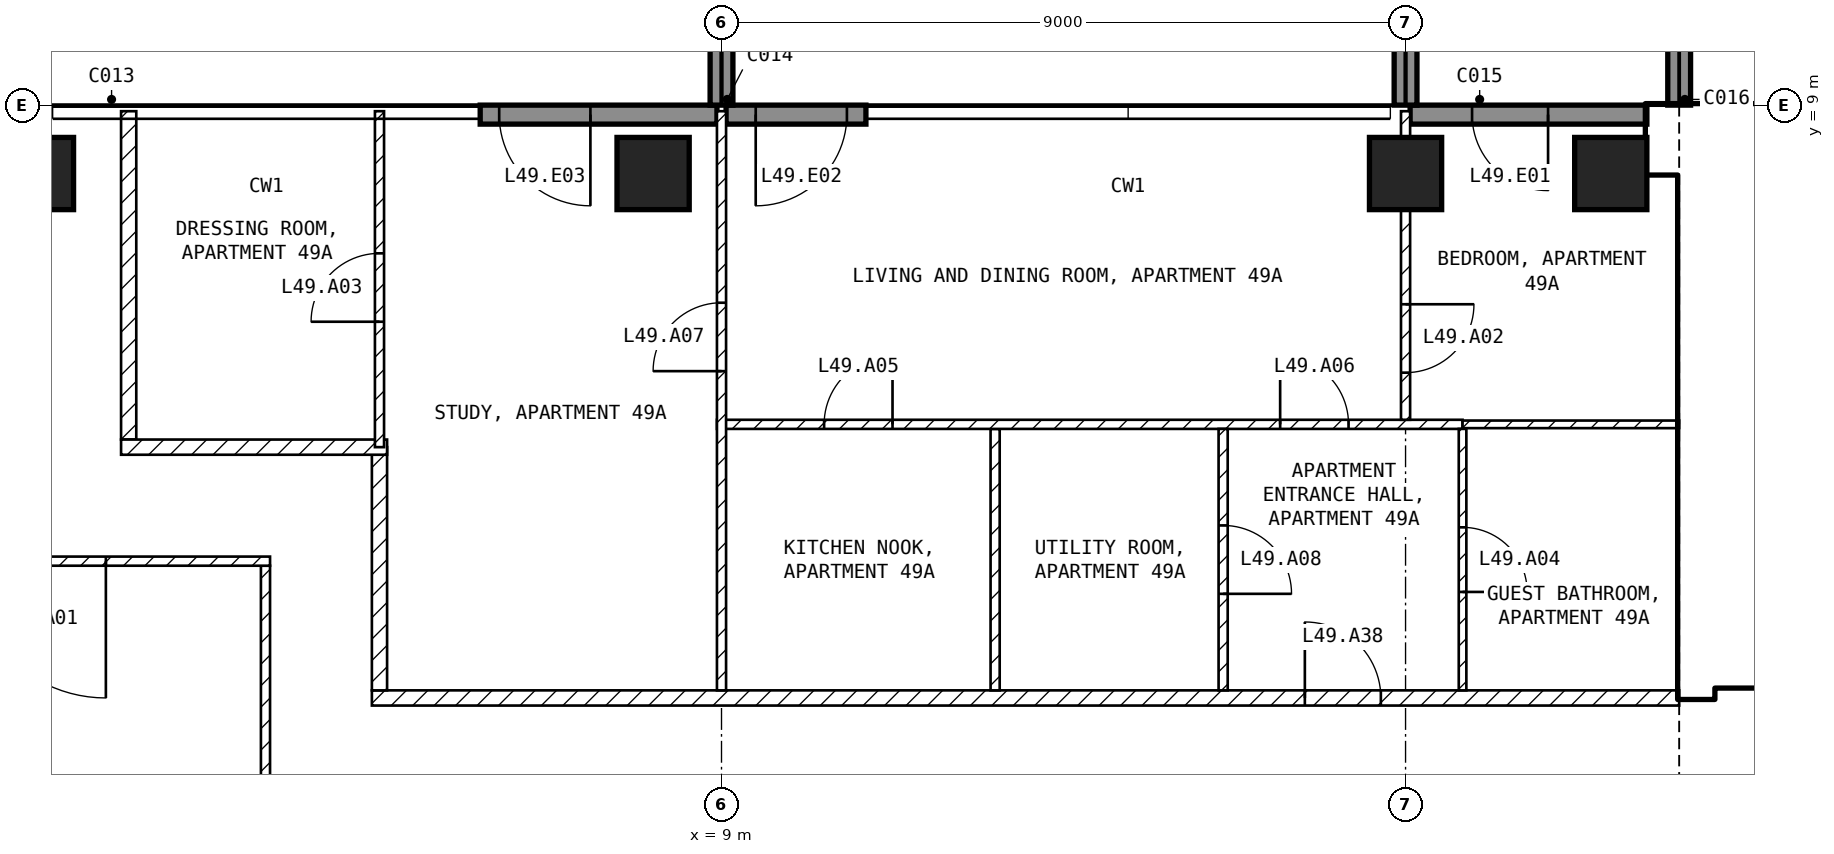
"""IFC4 building model, lengths in metres.
Left out: names, types, materials, properties, quantities, classifications, styles, units other than length and angle.
Written with IfcOpenShell. Run it as: python <this file> out.ifc"""

import sys

from ifc_helpers import new_model, si_unit, direction, frame, frame_2d, origin, origin_2d, place, context, subcontext, project, spatial, rectangle, extrude, element, fill, save


model = new_model("IFC4")
c1 = context("Model", 3, precision=1e-05, world=origin(), true_north=direction((0.0, 1.0)))
c2 = subcontext(c1, "Body", "Model", "MODEL_VIEW")
j1 = project(units=[si_unit("LENGTHUNIT", "METRE"), si_unit("PLANEANGLEUNIT", "RADIAN")], contexts=[c1])
p1 = place(None, origin())
s1 = spatial("IfcSite", under=j1, at=p1, CompositionType="ELEMENT")
p2 = place(p1, origin())
s2 = spatial("IfcBuilding", under=s1, at=p2, CompositionType="ELEMENT")
p3 = place(p2, frame((0.0, 0.0, 198.1)))
s3 = spatial("IfcBuildingStorey", under=s2, at=p3, CompositionType="ELEMENT", Elevation=198.1)
for number, where, z_axis, x_axis in (
    (1, (0.0, 8.1, -0.25), (0.0, 0.0, 1.0), (1.0, 0.0, 0.0)),
    (2, (8.1, 8.1, -0.25), (0.0, 0.0, 1.0), (1.0, 0.0, 0.0)),
    (3, (18.0, 8.1, -0.25), (0.0, 0.0, 1.0), (1.0, 0.0, 0.0)),
    (4, (20.7, 8.1, -0.25), (0.0, 0.0, 1.0), (1.0, 0.0, 0.0)),
):
    element("IfcColumn", number, at=place(p3, frame(where, z_axis=z_axis, x_axis=x_axis)), inside=s3, PredefinedType="COLUMN", context=c2, shape_type="SweptSolid", body=[
        extrude(rectangle(XDim=0.95, YDim=0.95, at=origin_2d()), origin(), (0.0, 0.0, 1.0), 3.5),
    ])
p4 = place(p3, frame((21.175, 8.875, 0.0), z_axis=(0.0, 0.0, 1.0), x_axis=(-1.0, 0.0, 0.0)))
e5 = element("IfcWall", 5, at=p4, inside=s3, PredefinedType="SOLIDWALL", context=c2, shape_type="SweptSolid", body=[
    extrude(rectangle(XDim=3.115, YDim=0.25, at=frame_2d((1.558, 0.0))), origin(), (0.0, 0.0, 1.0), 3.25),
])
p5 = place(p4, frame((1.3, 0.0, 0.0)))
e6 = element("IfcOpeningElement", 6, at=p5, cuts=e5, PredefinedType="OPENING", context=c2, shape_type="SweptSolid", body=[
    extrude(rectangle(XDim=1.0, YDim=2.4, at=frame_2d((0.5, 1.2))), frame((0.0, 0.135, 0.0), z_axis=(0.0, -1.0, 0.0), x_axis=(1.0, 0.0, 0.0)), (0.0, 0.0, 1.0), 0.27),
])
p6 = place(p3, frame((10.9, 8.875, 0.0), z_axis=(0.0, 0.0, 1.0), x_axis=(-1.0, 0.0, 0.0)))
e7 = element("IfcWall", 7, at=p6, inside=s3, PredefinedType="SOLIDWALL", context=c2, shape_type="SweptSolid", body=[
    extrude(rectangle(XDim=1.84, YDim=0.25, at=frame_2d((0.92, 0.0))), origin(), (0.0, 0.0, 1.0), 3.25),
])
p7 = place(p6, frame((0.25, 0.0, 0.0)))
e8 = element("IfcOpeningElement", 8, at=p7, cuts=e7, PredefinedType="OPENING", context=c2, shape_type="SweptSolid", body=[
    extrude(rectangle(XDim=1.2, YDim=2.4, at=frame_2d((0.6, 1.2))), frame((0.0, 0.135, 0.0), z_axis=(0.0, -1.0, 0.0), x_axis=(1.0, 0.0, 0.0)), (0.0, 0.0, 1.0), 0.27),
])
p8 = place(p3, frame((8.94, 8.875, 0.0), z_axis=(0.0, 0.0, 1.0), x_axis=(-1.0, 0.0, 0.0)))
e9 = element("IfcWall", 9, at=p8, inside=s3, PredefinedType="SOLIDWALL", context=c2, shape_type="SweptSolid", body=[
    extrude(rectangle(XDim=3.115, YDim=0.25, at=frame_2d((1.558, 0.0))), origin(), (0.0, 0.0, 1.0), 3.25),
])
p9 = place(p8, frame((1.665, 0.0, 0.0)))
e10 = element("IfcOpeningElement", 10, at=p9, cuts=e9, PredefinedType="OPENING", context=c2, shape_type="SweptSolid", body=[
    extrude(rectangle(XDim=1.2, YDim=2.4, at=frame_2d((0.6, 1.2))), frame((0.0, 0.135, 0.0), z_axis=(0.0, -1.0, 0.0), x_axis=(1.0, 0.0, 0.0)), (0.0, 0.0, 1.0), 0.27),
])
for number, where, z_axis, x_axis in (
    (11, (9.0, 9.0, 0.0), (0.0, 0.0, 1.0), (0.0, 1.0, 0.0)),
    (12, (18.0, 9.0, 0.0), (0.0, 0.0, 1.0), (0.0, 1.0, 0.0)),
    (13, (21.6, 9.0, 0.0), (0.0, 0.0, 1.0), (0.0, 1.0, 0.0)),
):
    element("IfcWall", number, at=place(p3, frame(where, z_axis=z_axis, x_axis=x_axis)), inside=s3, PredefinedType="SOLIDWALL", context=c2, shape_type="SweptSolid", body=[
        extrude(rectangle(XDim=2.7, YDim=0.3, at=frame_2d((1.35, 0.0))), origin(), (0.0, 0.0, 1.0), 3.25),
    ])
p10 = place(p3, frame((21.175, 8.55, 0.0), z_axis=(0.0, 0.0, 1.0), x_axis=(1.0, 0.0, 0.0)))
e14 = element("IfcWall", 14, at=p10, inside=s3, PredefinedType="SHEAR", context=c2, shape_type="SweptSolid", body=[
    extrude(rectangle(XDim=8.425, YDim=0.9, at=frame_2d((4.212, 0.0))), origin(), (0.0, 0.0, 1.0), 3.25),
])
p11 = place(p3, frame((21.825, 1.2, 0.0), z_axis=(0.0, 0.0, 1.0), x_axis=(0.0, 1.0, 0.0)))
e15 = element("IfcWall", 15, at=p11, inside=s3, PredefinedType="SHEAR", context=c2, shape_type="SweptSolid", body=[
    extrude(rectangle(XDim=6.9, YDim=0.45, at=frame_2d((3.45, 0.0))), origin(), (0.0, 0.0, 1.0), 3.25),
])
p12 = place(p3, frame((22.05, 1.45, 0.0), z_axis=(0.0, 0.0, 1.0), x_axis=(1.0, 0.0, 0.0)))
e16 = element("IfcWall", 16, at=p12, inside=s3, PredefinedType="SOLIDWALL", context=c2, shape_type="SweptSolid", body=[
    extrude(rectangle(XDim=11.15, YDim=0.2, at=frame_2d((5.575, 0.0))), origin(), (0.0, 0.0, 1.0), 3.25),
])
p13 = place(p12, frame((0.75, 0.0, 0.0)))
e17 = element("IfcOpeningElement", 17, at=p13, cuts=e16, PredefinedType="OPENING", context=c2, shape_type="SweptSolid", body=[
    extrude(rectangle(XDim=1.0, YDim=2.1, at=frame_2d((0.5, 1.05))), frame((0.0, 0.11, 0.0), z_axis=(0.0, -1.0, 0.0), x_axis=(1.0, 0.0, 0.0)), (0.0, 0.0, 1.0), 0.22),
])
p14 = place(p12, frame((3.25, 0.0, 0.0)))
e18 = element("IfcOpeningElement", 18, at=p14, cuts=e16, PredefinedType="OPENING", context=c2, shape_type="SweptSolid", body=[
    extrude(rectangle(XDim=1.0, YDim=2.1, at=frame_2d((0.5, 1.05))), frame((0.0, 0.11, 0.0), z_axis=(0.0, -1.0, 0.0), x_axis=(1.0, 0.0, 0.0)), (0.0, 0.0, 1.0), 0.22),
])
p15 = place(p12, frame((9.15, 0.0, 0.0)))
e19 = element("IfcOpeningElement", 19, at=p15, cuts=e16, PredefinedType="OPENING", context=c2, shape_type="SweptSolid", body=[
    extrude(rectangle(XDim=0.9, YDim=2.1, at=frame_2d((0.45, 1.05))), frame((0.0, 0.11, 0.0), z_axis=(0.0, -1.0, 0.0), x_axis=(1.0, 0.0, 0.0)), (0.0, 0.0, 1.0), 0.22),
])
p16 = place(p3, frame((22.05, 5.15, 0.0), z_axis=(0.0, 0.0, 1.0), x_axis=(1.0, 0.0, 0.0)))
e20 = element("IfcWall", 20, at=p16, inside=s3, PredefinedType="SOLIDWALL", context=c2, shape_type="SweptSolid", body=[
    extrude(rectangle(XDim=6.3, YDim=0.2, at=frame_2d((3.15, 0.0))), origin(), (0.0, 0.0, 1.0), 3.25),
])
p17 = place(p16, frame((0.2, 0.0, 0.0)))
e21 = element("IfcOpeningElement", 21, at=p17, cuts=e20, PredefinedType="OPENING", context=c2, shape_type="SweptSolid", body=[
    extrude(rectangle(XDim=1.0, YDim=2.1, at=frame_2d((0.5, 1.05))), frame((0.0, 0.11, 0.0), z_axis=(0.0, -1.0, 0.0), x_axis=(1.0, 0.0, 0.0)), (0.0, 0.0, 1.0), 0.22),
])
p18 = place(p3, frame((3.0, -2.94, 0.0), z_axis=(0.0, 0.0, 1.0), x_axis=(0.0, 1.0, 0.0)))
e22 = element("IfcWall", 22, at=p18, inside=s3, PredefinedType="PARTITIONING", context=c2, shape_type="SweptSolid", body=[
    extrude(rectangle(XDim=5.88, YDim=0.12, at=frame_2d((2.94, 0.0))), origin(), (0.0, 0.0, 1.0), 3.25),
])
p19 = place(p3, frame((3.06, 3.0, 0.0), z_axis=(0.0, 0.0, 1.0), x_axis=(-1.0, 0.0, 0.0)))
e23 = element("IfcWall", 23, at=p19, inside=s3, PredefinedType="PARTITIONING", context=c2, shape_type="SweptSolid", body=[
    extrude(rectangle(XDim=6.12, YDim=0.12, at=frame_2d((3.06, 0.0))), origin(), (0.0, 0.0, 1.0), 3.25),
])
p20 = place(p19, frame((2.16, 0.0, 0.0)))
e24 = element("IfcOpeningElement", 24, at=p20, cuts=e23, PredefinedType="OPENING", context=c2, shape_type="SweptSolid", body=[
    extrude(rectangle(XDim=1.8, YDim=2.1, at=frame_2d((0.9, 1.05))), frame((0.0, 0.07, 0.0), z_axis=(0.0, -1.0, 0.0), x_axis=(1.0, 0.0, 0.0)), (0.0, 0.0, 1.0), 0.14),
])
p21 = place(p3, frame((4.4, 1.2, 0.0), z_axis=(0.0, 0.0, 1.0), x_axis=(1.0, 0.0, 0.0)))
e25 = element("IfcWall", 25, at=p21, inside=s3, PredefinedType="PARTITIONING", context=c2, shape_type="SweptSolid", body=[
    extrude(rectangle(XDim=17.2, YDim=0.2, at=frame_2d((8.6, 0.0))), origin(), (0.0, 0.0, 1.0), 3.25),
])
p22 = place(p21, frame((12.275, 0.0, 0.0)))
e26 = element("IfcOpeningElement", 26, at=p22, cuts=e25, PredefinedType="OPENING", context=c2, shape_type="SweptSolid", body=[
    extrude(rectangle(XDim=1.0, YDim=2.1, at=frame_2d((0.5, 1.05))), frame((0.0, 0.11, 0.0), z_axis=(0.0, -1.0, 0.0), x_axis=(1.0, 0.0, 0.0)), (0.0, 0.0, 1.0), 0.22),
])
p23 = place(p3, frame((4.5, 4.5, 0.0), z_axis=(0.0, 0.0, 1.0), x_axis=(0.0, -1.0, 0.0)))
e27 = element("IfcWall", 27, at=p23, inside=s3, PredefinedType="PARTITIONING", context=c2, shape_type="SweptSolid", body=[
    extrude(rectangle(XDim=3.2, YDim=0.2, at=frame_2d((1.6, 0.0))), origin(), (0.0, 0.0, 1.0), 3.25),
])
p24 = place(p3, frame((1.2, 8.92, 0.0), z_axis=(0.0, 0.0, 1.0), x_axis=(0.0, -1.0, 0.0)))
e28 = element("IfcWall", 28, at=p24, inside=s3, PredefinedType="PARTITIONING", context=c2, shape_type="SweptSolid", body=[
    extrude(rectangle(XDim=4.32, YDim=0.2, at=frame_2d((2.16, 0.0))), origin(), (0.0, 0.0, 1.0), 3.25),
])
p25 = place(p3, frame((1.1, 4.5, 0.0), z_axis=(0.0, 0.0, 1.0), x_axis=(1.0, 0.0, 0.0)))
e29 = element("IfcWall", 29, at=p25, inside=s3, PredefinedType="PARTITIONING", context=c2, shape_type="SweptSolid", body=[
    extrude(rectangle(XDim=3.5, YDim=0.2, at=frame_2d((1.75, 0.0))), origin(), (0.0, 0.0, 1.0), 3.25),
])
p26 = place(p3, frame((12.6, 4.74, 0.0), z_axis=(0.0, 0.0, 1.0), x_axis=(0.0, -1.0, 0.0)))
e30 = element("IfcWall", 30, at=p26, inside=s3, PredefinedType="PARTITIONING", context=c2, shape_type="SweptSolid", body=[
    extrude(rectangle(XDim=3.44, YDim=0.12, at=frame_2d((1.72, 0.0))), origin(), (0.0, 0.0, 1.0), 3.25),
])
p27 = place(p3, frame((8.94, 4.8, 0.0), z_axis=(0.0, 0.0, 1.0), x_axis=(1.0, 0.0, 0.0)))
e31 = element("IfcWall", 31, at=p27, inside=s3, PredefinedType="PARTITIONING", context=c2, shape_type="SweptSolid", body=[
    extrude(rectangle(XDim=9.81, YDim=0.12, at=frame_2d((4.905, 0.0))), origin(), (0.0, 0.0, 1.0), 3.25),
])
p28 = place(p27, frame((1.41, 0.0, 0.0)))
e32 = element("IfcOpeningElement", 32, at=p28, cuts=e31, PredefinedType="OPENING", context=c2, shape_type="SweptSolid", body=[
    extrude(rectangle(XDim=0.9, YDim=2.1, at=frame_2d((0.45, 1.05))), frame((0.0, 0.07, 0.0), z_axis=(0.0, -1.0, 0.0), x_axis=(1.0, 0.0, 0.0)), (0.0, 0.0, 1.0), 0.14),
])
p29 = place(p27, frame((7.41, 0.0, 0.0)))
e33 = element("IfcOpeningElement", 33, at=p29, cuts=e31, PredefinedType="OPENING", context=c2, shape_type="SweptSolid", body=[
    extrude(rectangle(XDim=0.9, YDim=2.1, at=frame_2d((0.45, 1.05))), frame((0.0, 0.07, 0.0), z_axis=(0.0, -1.0, 0.0), x_axis=(1.0, 0.0, 0.0)), (0.0, 0.0, 1.0), 0.14),
])
p30 = place(p3, frame((9.0, 1.3, 0.0), z_axis=(0.0, 0.0, 1.0), x_axis=(0.0, 1.0, 0.0)))
e34 = element("IfcWall", 34, at=p30, inside=s3, PredefinedType="PARTITIONING", context=c2, shape_type="SweptSolid", body=[
    extrude(rectangle(XDim=7.62, YDim=0.12, at=frame_2d((3.81, 0.0))), origin(), (0.0, 0.0, 1.0), 3.25),
])
p31 = place(p30, frame((4.2, 0.0, 0.0)))
e35 = element("IfcOpeningElement", 35, at=p31, cuts=e34, PredefinedType="OPENING", context=c2, shape_type="SweptSolid", body=[
    extrude(rectangle(XDim=0.9, YDim=2.1, at=frame_2d((0.45, 1.05))), frame((0.0, 0.07, 0.0), z_axis=(0.0, -1.0, 0.0), x_axis=(1.0, 0.0, 0.0)), (0.0, 0.0, 1.0), 0.14),
])
p32 = place(p3, frame((15.6, 4.74, 0.0), z_axis=(0.0, 0.0, 1.0), x_axis=(0.0, -1.0, 0.0)))
e36 = element("IfcWall", 36, at=p32, inside=s3, PredefinedType="PARTITIONING", context=c2, shape_type="SweptSolid", body=[
    extrude(rectangle(XDim=3.44, YDim=0.12, at=frame_2d((1.72, 0.0))), origin(), (0.0, 0.0, 1.0), 3.25),
])
p33 = place(p32, frame((1.27, 0.0, 0.0)))
e37 = element("IfcOpeningElement", 37, at=p33, cuts=e36, PredefinedType="OPENING", context=c2, shape_type="SweptSolid", body=[
    extrude(rectangle(XDim=0.9, YDim=2.1, at=frame_2d((0.45, 1.05))), frame((0.0, 0.07, 0.0), z_axis=(0.0, -1.0, 0.0), x_axis=(1.0, 0.0, 0.0)), (0.0, 0.0, 1.0), 0.14),
])
p34 = place(p3, frame((18.75, 4.74, 0.0), z_axis=(0.0, 0.0, 1.0), x_axis=(0.0, -1.0, 0.0)))
e38 = element("IfcWall", 38, at=p34, inside=s3, PredefinedType="PARTITIONING", context=c2, shape_type="SweptSolid", body=[
    extrude(rectangle(XDim=3.44, YDim=0.1, at=frame_2d((1.72, 0.0))), origin(), (0.0, 0.0, 1.0), 3.25),
])
p35 = place(p34, frame((1.295, 0.0, 0.0)))
e39 = element("IfcOpeningElement", 39, at=p35, cuts=e38, PredefinedType="OPENING", context=c2, shape_type="SweptSolid", body=[
    extrude(rectangle(XDim=0.85, YDim=2.1, at=frame_2d((0.425, 1.05))), frame((0.0, 0.06, 0.0), z_axis=(0.0, -1.0, 0.0), x_axis=(1.0, 0.0, 0.0)), (0.0, 0.0, 1.0), 0.12),
])
p36 = place(p3, frame((18.75, 4.8, 0.0), z_axis=(0.0, 0.0, 1.0), x_axis=(1.0, 0.0, 0.0)))
e40 = element("IfcWall", 40, at=p36, inside=s3, PredefinedType="PARTITIONING", context=c2, shape_type="SweptSolid", body=[
    extrude(rectangle(XDim=2.85, YDim=0.1, at=frame_2d((1.425, 0.0))), origin(), (0.0, 0.0, 1.0), 3.25),
])
p37 = place(p3, frame((18.0, 8.92, 0.0), z_axis=(0.0, 0.0, 1.0), x_axis=(0.0, -1.0, 0.0)))
e41 = element("IfcWall", 41, at=p37, inside=s3, PredefinedType="PARTITIONING", context=c2, shape_type="SweptSolid", body=[
    extrude(rectangle(XDim=4.06, YDim=0.12, at=frame_2d((2.03, 0.0))), origin(), (0.0, 0.0, 1.0), 2.48),
])
p38 = place(p37, frame((2.54, 0.0, 0.0)))
e42 = element("IfcOpeningElement", 42, at=p38, cuts=e41, PredefinedType="OPENING", context=c2, shape_type="SweptSolid", body=[
    extrude(rectangle(XDim=0.9, YDim=2.1, at=frame_2d((0.45, 1.05))), frame((0.0, 0.07, 0.0), z_axis=(0.0, -1.0, 0.0), x_axis=(1.0, 0.0, 0.0)), (0.0, 0.0, 1.0), 0.14),
])
p39 = place(p3, frame((4.5, 4.5, 0.0), z_axis=(0.0, 0.0, 1.0), x_axis=(0.0, 1.0, 0.0)))
e43 = element("IfcWall", 43, at=p39, inside=s3, PredefinedType="PARTITIONING", context=c2, shape_type="SweptSolid", body=[
    extrude(rectangle(XDim=4.42, YDim=0.12, at=frame_2d((2.21, 0.0))), origin(), (0.0, 0.0, 1.0), 3.25),
])
p40 = place(p39, frame((1.65, 0.0, 0.0)))
e44 = element("IfcOpeningElement", 44, at=p40, cuts=e43, PredefinedType="OPENING", context=c2, shape_type="SweptSolid", body=[
    extrude(rectangle(XDim=0.9, YDim=2.1, at=frame_2d((0.45, 1.05))), frame((0.0, 0.07, 0.0), z_axis=(0.0, -1.0, 0.0), x_axis=(1.0, 0.0, 0.0)), (0.0, 0.0, 1.0), 0.14),
])
p41 = place(p5, origin())
e45 = element("IfcDoor", 45, at=p41, inside=s3, OperationType="SINGLE_SWING_LEFT", PredefinedType="DOOR", context=c2, shape_type="SweptSolid", body=[
    extrude(rectangle(XDim=1.0, YDim=2.4, at=frame_2d((0.5, 1.2))), frame((0.0, 0.025, 0.0), z_axis=(0.0, -1.0, 0.0), x_axis=(1.0, 0.0, 0.0)), (0.0, 0.0, 1.0), 0.05),
])
fill(e6, e45)
p42 = place(p7, origin())
e46 = element("IfcDoor", 46, at=p42, inside=s3, OperationType="SINGLE_SWING_RIGHT", PredefinedType="DOOR", context=c2, shape_type="SweptSolid", body=[
    extrude(rectangle(XDim=1.2, YDim=2.4, at=frame_2d((0.6, 1.2))), frame((0.0, 0.025, 0.0), z_axis=(0.0, -1.0, 0.0), x_axis=(1.0, 0.0, 0.0)), (0.0, 0.0, 1.0), 0.05),
])
fill(e8, e46)
p43 = place(p9, origin())
e47 = element("IfcDoor", 47, at=p43, inside=s3, OperationType="SINGLE_SWING_LEFT", PredefinedType="DOOR", context=c2, shape_type="SweptSolid", body=[
    extrude(rectangle(XDim=1.2, YDim=2.4, at=frame_2d((0.6, 1.2))), frame((0.0, 0.025, 0.0), z_axis=(0.0, -1.0, 0.0), x_axis=(1.0, 0.0, 0.0)), (0.0, 0.0, 1.0), 0.05),
])
fill(e10, e47)
p44 = place(p17, origin())
e48 = element("IfcDoor", 48, at=p44, inside=s3, OperationType="SINGLE_SWING_LEFT", PredefinedType="DOOR", context=c2, shape_type="SweptSolid", body=[
    extrude(rectangle(XDim=1.0, YDim=2.1, at=frame_2d((0.5, 1.05))), frame((0.0, 0.025, 0.0), z_axis=(0.0, -1.0, 0.0), x_axis=(1.0, 0.0, 0.0)), (0.0, 0.0, 1.0), 0.05),
])
fill(e21, e48)
p45 = place(p20, origin())
e49 = element("IfcDoor", 49, at=p45, inside=s3, OperationType="SINGLE_SWING_LEFT", PredefinedType="DOOR", context=c2, shape_type="SweptSolid", body=[
    extrude(rectangle(XDim=1.8, YDim=2.1, at=frame_2d((0.9, 1.05))), frame((0.0, 0.025, 0.0), z_axis=(0.0, -1.0, 0.0), x_axis=(1.0, 0.0, 0.0)), (0.0, 0.0, 1.0), 0.05),
])
fill(e24, e49)
p46 = place(p38, origin())
e50 = element("IfcDoor", 50, at=p46, inside=s3, OperationType="SINGLE_SWING_LEFT", PredefinedType="DOOR", context=c2, shape_type="SweptSolid", body=[
    extrude(rectangle(XDim=0.9, YDim=2.1, at=frame_2d((0.45, 1.05))), frame((0.0, 0.025, 0.0), z_axis=(0.0, -1.0, 0.0), x_axis=(1.0, 0.0, 0.0)), (0.0, 0.0, 1.0), 0.05),
])
fill(e42, e50)
p47 = place(p40, origin())
e51 = element("IfcDoor", 51, at=p47, inside=s3, OperationType="SINGLE_SWING_LEFT", PredefinedType="DOOR", context=c2, shape_type="SweptSolid", body=[
    extrude(rectangle(XDim=0.9, YDim=2.1, at=frame_2d((0.45, 1.05))), frame((0.0, 0.025, 0.0), z_axis=(0.0, -1.0, 0.0), x_axis=(1.0, 0.0, 0.0)), (0.0, 0.0, 1.0), 0.05),
])
fill(e44, e51)
p48 = place(p35, origin())
e52 = element("IfcDoor", 52, at=p48, inside=s3, OperationType="SINGLE_SWING_RIGHT", PredefinedType="DOOR", context=c2, shape_type="SweptSolid", body=[
    extrude(rectangle(XDim=0.85, YDim=2.1, at=frame_2d((0.425, 1.05))), frame((0.0, 0.025, 0.0), z_axis=(0.0, -1.0, 0.0), x_axis=(1.0, 0.0, 0.0)), (0.0, 0.0, 1.0), 0.05),
])
fill(e39, e52)
p49 = place(p28, origin())
e53 = element("IfcDoor", 53, at=p49, inside=s3, OperationType="SINGLE_SWING_RIGHT", PredefinedType="DOOR", context=c2, shape_type="SweptSolid", body=[
    extrude(rectangle(XDim=0.9, YDim=2.1, at=frame_2d((0.45, 1.05))), frame((0.0, 0.025, 0.0), z_axis=(0.0, -1.0, 0.0), x_axis=(1.0, 0.0, 0.0)), (0.0, 0.0, 1.0), 0.05),
])
fill(e32, e53)
p50 = place(p29, origin())
e54 = element("IfcDoor", 54, at=p50, inside=s3, OperationType="SINGLE_SWING_LEFT", PredefinedType="DOOR", context=c2, shape_type="SweptSolid", body=[
    extrude(rectangle(XDim=0.9, YDim=2.1, at=frame_2d((0.45, 1.05))), frame((0.0, 0.025, 0.0), z_axis=(0.0, -1.0, 0.0), x_axis=(1.0, 0.0, 0.0)), (0.0, 0.0, 1.0), 0.05),
])
fill(e33, e54)
p51 = place(p31, origin())
e55 = element("IfcDoor", 55, at=p51, inside=s3, OperationType="SINGLE_SWING_LEFT", PredefinedType="DOOR", context=c2, shape_type="SweptSolid", body=[
    extrude(rectangle(XDim=0.9, YDim=2.1, at=frame_2d((0.45, 1.05))), frame((0.0, 0.025, 0.0), z_axis=(0.0, -1.0, 0.0), x_axis=(1.0, 0.0, 0.0)), (0.0, 0.0, 1.0), 0.05),
])
fill(e35, e55)
p52 = place(p33, origin())
e56 = element("IfcDoor", 56, at=p52, inside=s3, OperationType="SINGLE_SWING_RIGHT", PredefinedType="DOOR", context=c2, shape_type="SweptSolid", body=[
    extrude(rectangle(XDim=0.9, YDim=2.1, at=frame_2d((0.45, 1.05))), frame((0.0, 0.025, 0.0), z_axis=(0.0, -1.0, 0.0), x_axis=(1.0, 0.0, 0.0)), (0.0, 0.0, 1.0), 0.05),
])
fill(e37, e56)
p53 = place(p22, origin())
e57 = element("IfcDoor", 57, at=p53, inside=s3, OperationType="SINGLE_SWING_LEFT", PredefinedType="DOOR", context=c2, shape_type="SweptSolid", body=[
    extrude(rectangle(XDim=1.0, YDim=2.1, at=frame_2d((0.5, 1.05))), frame((0.0, 0.025, 0.0), z_axis=(0.0, -1.0, 0.0), x_axis=(1.0, 0.0, 0.0)), (0.0, 0.0, 1.0), 0.05),
])
fill(e26, e57)
save(model, sys.argv[1])
